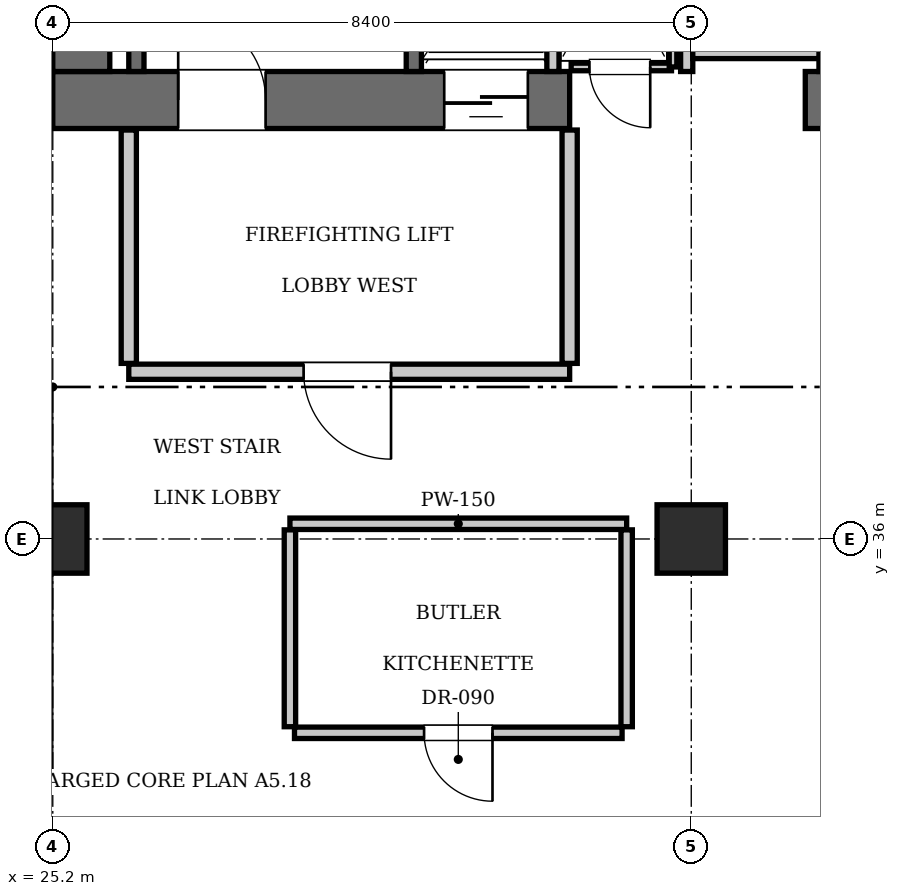
"""IFC4 building model, lengths in metres.
Left out: names, types, materials, properties, quantities, classifications, styles, units other than length and angle.
Written with IfcOpenShell. Run it as: python <this file> out.ifc"""

import sys

from ifc_helpers import new_model, si_unit, direction, frame, frame_2d, origin, origin_2d, place, context, subcontext, project, spatial, rectangle, extrude, element, fill, save


model = new_model("IFC4")
c1 = context("Model", 3, precision=1e-05, world=origin(), true_north=direction((0.0, 1.0)))
c2 = subcontext(c1, "Body", "Model", "MODEL_VIEW")
j1 = project(units=[si_unit("LENGTHUNIT", "METRE"), si_unit("PLANEANGLEUNIT", "RADIAN")], contexts=[c1])
p1 = place(None, origin())
s1 = spatial("IfcSite", under=j1, at=p1, CompositionType="ELEMENT")
p2 = place(p1, origin())
s2 = spatial("IfcBuilding", under=s1, at=p2, CompositionType="ELEMENT")
p3 = place(p2, frame((0.0, 0.0, 131.25)))
s3 = spatial("IfcBuildingStorey", under=s2, at=p3, CompositionType="ELEMENT", Elevation=131.25)
p4 = place(p3, frame((25.2, 41.775, 0.0), z_axis=(0.0, 0.0, 1.0), x_axis=(1.0, 0.0, 0.0)))
e1 = element("IfcWall", 1, at=p4, inside=s3, PredefinedType="SHEAR", context=c2, shape_type="SweptSolid", body=[
    extrude(rectangle(XDim=6.8, YDim=0.75, at=frame_2d((3.4, 0.0))), origin(), (0.0, 0.0, 1.0), 3.85),
])
p5 = place(p4, frame((1.65, 0.0, 0.0)))
e2 = element("IfcOpeningElement", 2, at=p5, cuts=e1, PredefinedType="OPENING", context=c2, shape_type="SweptSolid", body=[
    extrude(rectangle(XDim=1.15, YDim=2.15, at=frame_2d((0.575, 1.075))), frame((0.0, 0.385, 0.0), z_axis=(0.0, -1.0, 0.0), x_axis=(1.0, 0.0, 0.0)), (0.0, 0.0, 1.0), 0.77),
])
p6 = place(p4, frame((5.15, 0.0, 0.0)))
e3 = element("IfcOpeningElement", 3, at=p6, cuts=e1, PredefinedType="OPENING", context=c2, shape_type="SweptSolid", body=[
    extrude(rectangle(XDim=1.1, YDim=2.2, at=frame_2d((0.55, 1.1))), frame((0.0, 0.385, 0.0), z_axis=(0.0, -1.0, 0.0), x_axis=(1.0, 0.0, 0.0)), (0.0, 0.0, 1.0), 0.77),
])
p7 = place(p3, frame((35.1, 41.775, 0.0), z_axis=(0.0, 0.0, 1.0), x_axis=(1.0, 0.0, 0.0)))
e4 = element("IfcWall", 4, at=p7, inside=s3, PredefinedType="SHEAR", context=c2, shape_type="SweptSolid", body=[
    extrude(rectangle(XDim=5.4, YDim=0.75, at=frame_2d((2.7, 0.0))), origin(), (0.0, 0.0, 1.0), 3.85),
])
p8 = place(p3, frame((25.575, 42.15, 0.0), z_axis=(0.0, 0.0, 1.0), x_axis=(0.0, 1.0, 0.0)))
e5 = element("IfcWall", 5, at=p8, inside=s3, PredefinedType="SHEAR", context=c2, shape_type="SweptSolid", body=[
    extrude(rectangle(XDim=1.9, YDim=0.75, at=frame_2d((0.95, 0.0))), origin(), (0.0, 0.0, 1.0), 3.85),
])
for number, where, z_axis, x_axis in (
    (6, (25.2, 36.0, 0.0), (0.0, 0.0, 1.0), (1.0, 0.0, 0.0)),
    (7, (33.6, 36.0, 0.0), (0.0, 0.0, 1.0), (1.0, 0.0, 0.0)),
):
    element("IfcColumn", number, at=place(p3, frame(where, z_axis=z_axis, x_axis=x_axis)), inside=s3, PredefinedType="COLUMN", context=c2, shape_type="SweptSolid", body=[
        extrude(rectangle(XDim=0.9, YDim=0.9, at=origin_2d()), origin(), (0.0, 0.0, 1.0), 3.85),
    ])
p9 = place(p3, frame((29.95, 42.15, 0.0), z_axis=(0.0, 0.0, 1.0), x_axis=(0.0, 1.0, 0.0)))
e8 = element("IfcWall", 8, at=p9, inside=s3, PredefinedType="SOLIDWALL", context=c2, shape_type="SweptSolid", body=[
    extrude(rectangle(XDim=9.0, YDim=0.2, at=frame_2d((4.5, 0.0))), origin(), (0.0, 0.0, 1.0), 3.61),
])
p10 = place(p3, frame((26.3, 42.15, 0.0), z_axis=(0.0, 0.0, 1.0), x_axis=(0.0, 1.0, 0.0)))
e9 = element("IfcWall", 9, at=p10, inside=s3, PredefinedType="SOLIDWALL", context=c2, shape_type="SweptSolid", body=[
    extrude(rectangle(XDim=1.87, YDim=0.2, at=frame_2d((0.935, 0.0))), origin(), (0.0, 0.0, 1.0), 3.61),
])
p11 = place(p3, frame((31.78, 42.15, 0.0), z_axis=(0.0, 0.0, 1.0), x_axis=(0.0, 1.0, 0.0)))
e10 = element("IfcWall", 10, at=p11, inside=s3, PredefinedType="SOLIDWALL", context=c2, shape_type="SweptSolid", body=[
    extrude(rectangle(XDim=2.59, YDim=0.16, at=frame_2d((1.295, 0.0))), origin(), (0.0, 0.0, 1.0), 3.61),
])
for number, where, z_axis, x_axis in (
    (11, (33.54, 42.15, 0.0), (0.0, 0.0, 1.0), (0.0, 1.0, 0.0)),
    (12, (35.36, 42.15, 0.0), (0.0, 0.0, 1.0), (0.0, 1.0, 0.0)),
):
    element("IfcWall", number, at=place(p3, frame(where, z_axis=z_axis, x_axis=x_axis)), inside=s3, PredefinedType="SOLIDWALL", context=c2, shape_type="SweptSolid", body=[
        extrude(rectangle(XDim=2.25, YDim=0.16, at=frame_2d((1.125, 0.0))), origin(), (0.0, 0.0, 1.0), 3.61),
    ])
p12 = place(p3, frame((33.62, 42.4, 0.0), z_axis=(0.0, 0.0, 1.0), x_axis=(1.0, 0.0, 0.0)))
e13 = element("IfcWall", 13, at=p12, inside=s3, PredefinedType="SOLIDWALL", context=c2, shape_type="SweptSolid", body=[
    extrude(rectangle(XDim=1.66, YDim=0.16, at=frame_2d((0.83, 0.0))), origin(), (0.0, 0.0, 1.0), 3.61),
])
p13 = place(p3, frame((26.2, 38.2, 0.0), z_axis=(0.0, 0.0, 1.0), x_axis=(1.0, 0.0, 0.0)))
e14 = element("IfcWall", 14, at=p13, inside=s3, PredefinedType="PARTITIONING", context=c2, shape_type="SweptSolid", body=[
    extrude(rectangle(XDim=5.8, YDim=0.2, at=frame_2d((2.9, 0.0))), origin(), (0.0, 0.0, 1.0), 3.61),
])
p14 = place(p13, frame((2.3, 0.0, 0.0)))
e15 = element("IfcOpeningElement", 15, at=p14, cuts=e14, PredefinedType="OPENING", context=c2, shape_type="SweptSolid", body=[
    extrude(rectangle(XDim=1.15, YDim=2.15, at=frame_2d((0.575, 1.075))), frame((0.0, 0.11, 0.0), z_axis=(0.0, -1.0, 0.0), x_axis=(1.0, 0.0, 0.0)), (0.0, 0.0, 1.0), 0.22),
])
for number, where, z_axis, x_axis in (
    (16, (26.2, 38.31, 0.0), (0.0, 0.0, 1.0), (0.0, 1.0, 0.0)),
    (17, (32.0, 38.31, 0.0), (0.0, 0.0, 1.0), (0.0, 1.0, 0.0)),
):
    element("IfcWall", number, at=place(p3, frame(where, z_axis=z_axis, x_axis=x_axis)), inside=s3, PredefinedType="PARTITIONING", context=c2, shape_type="SweptSolid", body=[
        extrude(rectangle(XDim=3.07, YDim=0.2, at=frame_2d((1.535, 0.0))), origin(), (0.0, 0.0, 1.0), 3.61),
    ])
p15 = place(p3, frame((32.02, 42.21, 0.0), z_axis=(0.0, 0.0, 1.0), x_axis=(1.0, 0.0, 0.0)))
e18 = element("IfcWall", 18, at=p15, inside=s3, PredefinedType="PARTITIONING", context=c2, shape_type="SweptSolid", body=[
    extrude(rectangle(XDim=1.32, YDim=0.1, at=frame_2d((0.66, 0.0))), origin(), (0.0, 0.0, 1.0), 3.61),
])
p16 = place(p15, frame((0.24, 0.0, 0.0)))
e19 = element("IfcOpeningElement", 19, at=p16, cuts=e18, PredefinedType="OPENING", context=c2, shape_type="SweptSolid", body=[
    extrude(rectangle(XDim=0.8, YDim=2.05, at=frame_2d((0.4, 1.025))), frame((0.0, 0.06, 0.0), z_axis=(0.0, -1.0, 0.0), x_axis=(1.0, 0.0, 0.0)), (0.0, 0.0, 1.0), 0.12),
])
p17 = place(p3, frame((33.36, 42.21, 0.0), z_axis=(0.0, 0.0, 1.0), x_axis=(0.0, 1.0, 0.0)))
e20 = element("IfcWall", 20, at=p17, inside=s3, PredefinedType="PARTITIONING", context=c2, shape_type="SweptSolid", body=[
    extrude(rectangle(XDim=2.73, YDim=0.1, at=frame_2d((1.365, 0.0))), origin(), (0.0, 0.0, 1.0), 3.61),
])
p18 = place(p3, frame((28.32, 36.2, 0.0), z_axis=(0.0, 0.0, 1.0), x_axis=(1.0, 0.0, 0.0)))
e21 = element("IfcWall", 21, at=p18, inside=s3, PredefinedType="PARTITIONING", context=c2, shape_type="SweptSolid", body=[
    extrude(rectangle(XDim=4.43, YDim=0.15, at=frame_2d((2.215, 0.0))), origin(), (0.0, 0.0, 1.0), 3.61),
])
for number, where, z_axis, x_axis in (
    (22, (28.32, 33.53, 0.0), (0.0, 0.0, 1.0), (0.0, 1.0, 0.0)),
    (23, (32.75, 33.53, 0.0), (0.0, 0.0, 1.0), (0.0, 1.0, 0.0)),
):
    element("IfcWall", number, at=place(p3, frame(where, z_axis=z_axis, x_axis=x_axis)), inside=s3, PredefinedType="PARTITIONING", context=c2, shape_type="SweptSolid", body=[
        extrude(rectangle(XDim=2.59, YDim=0.15, at=frame_2d((1.295, 0.0))), origin(), (0.0, 0.0, 1.0), 3.61),
    ])
p19 = place(p3, frame((28.38, 33.45, 0.0), z_axis=(0.0, 0.0, 1.0), x_axis=(1.0, 0.0, 0.0)))
e24 = element("IfcWall", 24, at=p19, inside=s3, PredefinedType="PARTITIONING", context=c2, shape_type="SweptSolid", body=[
    extrude(rectangle(XDim=4.31, YDim=0.15, at=frame_2d((2.155, 0.0))), origin(), (0.0, 0.0, 1.0), 3.61),
])
p20 = place(p19, frame((1.705, 0.0, 0.0)))
e25 = element("IfcOpeningElement", 25, at=p20, cuts=e24, PredefinedType="OPENING", context=c2, shape_type="SweptSolid", body=[
    extrude(rectangle(XDim=0.9, YDim=2.1, at=frame_2d((0.45, 1.05))), frame((0.0, 0.085, 0.0), z_axis=(0.0, -1.0, 0.0), x_axis=(1.0, 0.0, 0.0)), (0.0, 0.0, 1.0), 0.17),
])
p21 = place(p5, origin())
e26 = element("IfcDoor", 26, at=p21, inside=s3, OperationType="SINGLE_SWING_LEFT", PredefinedType="DOOR", context=c2, shape_type="SweptSolid", body=[
    extrude(rectangle(XDim=1.15, YDim=2.15, at=frame_2d((0.575, 1.075))), frame((0.0, 0.025, 0.0), z_axis=(0.0, -1.0, 0.0), x_axis=(1.0, 0.0, 0.0)), (0.0, 0.0, 1.0), 0.05),
])
fill(e2, e26)
p22 = place(p6, frame((1.1, 0.0, 0.0), z_axis=(0.0, 0.0, 1.0), x_axis=(-1.0, 0.0, 0.0)))
e27 = element("IfcDoor", 27, at=p22, inside=s3, OperationType="SLIDING_TO_LEFT", PredefinedType="DOOR", context=c2, shape_type="SweptSolid", body=[
    extrude(rectangle(XDim=1.1, YDim=2.2, at=frame_2d((0.55, 1.1))), frame((0.0, 0.025, 0.0), z_axis=(0.0, -1.0, 0.0), x_axis=(1.0, 0.0, 0.0)), (0.0, 0.0, 1.0), 0.05),
])
fill(e3, e27)
p23 = place(p14, frame((1.15, 0.0, 0.0), z_axis=(0.0, 0.0, 1.0), x_axis=(-1.0, 0.0, 0.0)))
e28 = element("IfcDoor", 28, at=p23, inside=s3, OperationType="SINGLE_SWING_LEFT", PredefinedType="DOOR", context=c2, shape_type="SweptSolid", body=[
    extrude(rectangle(XDim=1.15, YDim=2.15, at=frame_2d((0.575, 1.075))), frame((0.0, 0.025, 0.0), z_axis=(0.0, -1.0, 0.0), x_axis=(1.0, 0.0, 0.0)), (0.0, 0.0, 1.0), 0.05),
])
fill(e15, e28)
p24 = place(p16, frame((0.8, 0.0, 0.0), z_axis=(0.0, 0.0, 1.0), x_axis=(-1.0, 0.0, 0.0)))
e29 = element("IfcDoor", 29, at=p24, inside=s3, OperationType="SINGLE_SWING_LEFT", PredefinedType="DOOR", context=c2, shape_type="SweptSolid", body=[
    extrude(rectangle(XDim=0.8, YDim=2.05, at=frame_2d((0.4, 1.025))), frame((0.0, 0.025, 0.0), z_axis=(0.0, -1.0, 0.0), x_axis=(1.0, 0.0, 0.0)), (0.0, 0.0, 1.0), 0.05),
])
fill(e19, e29)
p25 = place(p20, frame((0.9, 0.0, 0.0), z_axis=(0.0, 0.0, 1.0), x_axis=(-1.0, 0.0, 0.0)))
e30 = element("IfcDoor", 30, at=p25, inside=s3, OperationType="SINGLE_SWING_LEFT", PredefinedType="DOOR", context=c2, shape_type="SweptSolid", body=[
    extrude(rectangle(XDim=0.9, YDim=2.1, at=frame_2d((0.45, 1.05))), frame((0.0, 0.025, 0.0), z_axis=(0.0, -1.0, 0.0), x_axis=(1.0, 0.0, 0.0)), (0.0, 0.0, 1.0), 0.05),
])
fill(e25, e30)
save(model, sys.argv[1])
